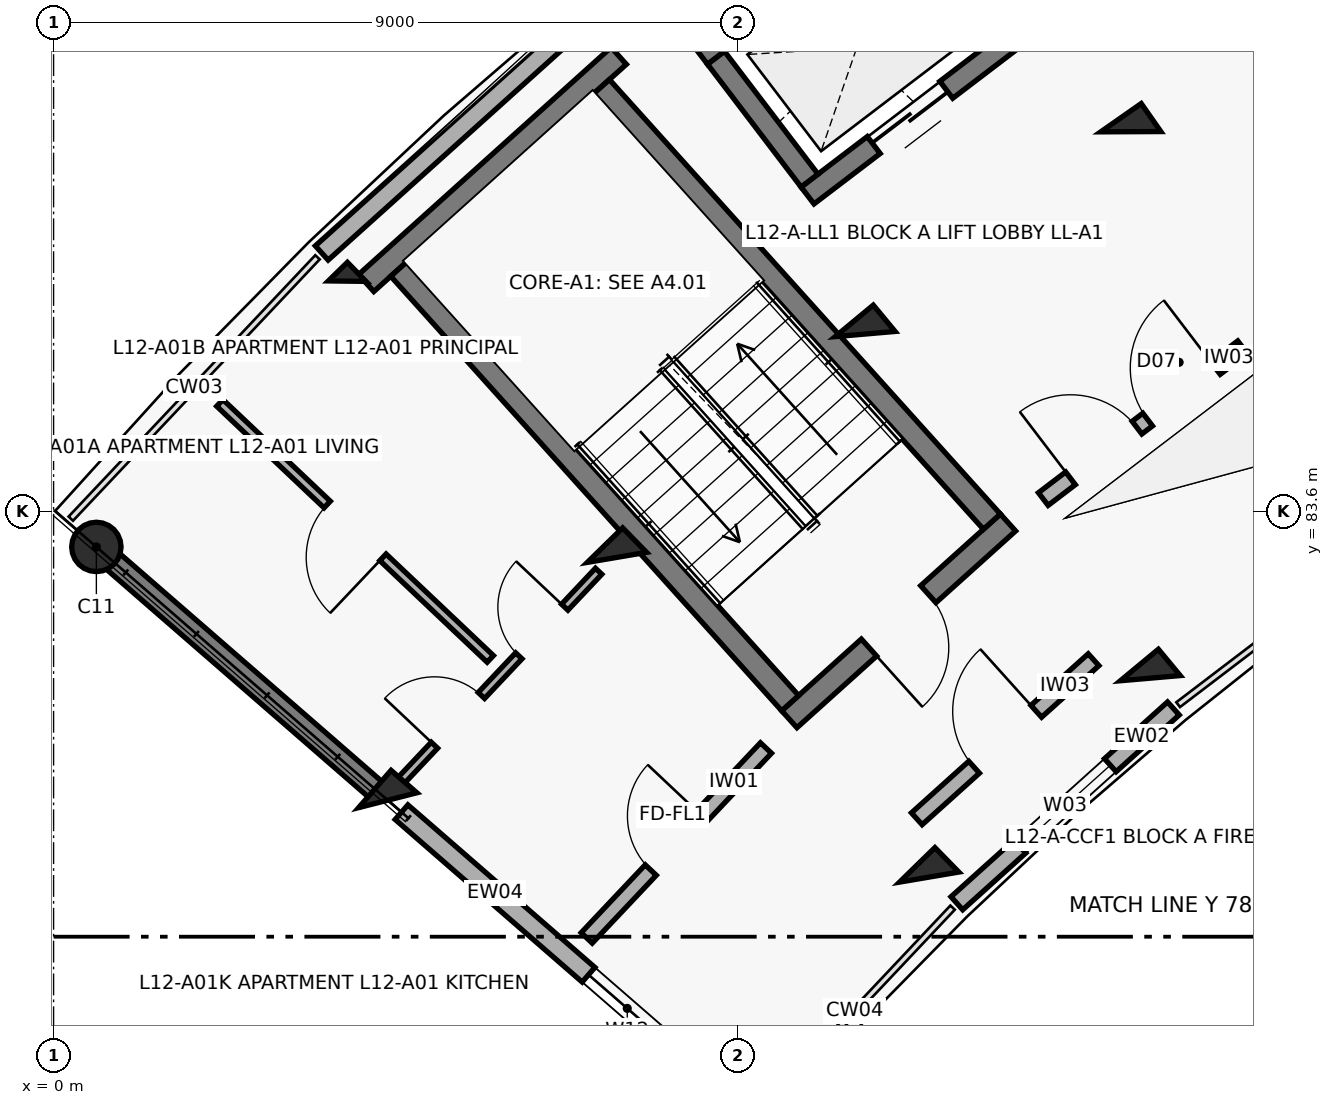
"""IFC4 building model, lengths in metres.
Left out: names, types, materials, properties, quantities, classifications, styles, units other than length and angle.
Written with IfcOpenShell. Run it as: python <this file> out.ifc"""

import sys

from ifc_helpers import new_model, si_unit, direction, frame, frame_2d, origin, origin_2d, place, context, subcontext, project, spatial, rectangle, circle, extrude, element, fill, save


model = new_model("IFC4")
c1 = context("Model", 3, precision=1e-05, world=origin(), true_north=direction((0.0, 1.0)))
c2 = subcontext(c1, "Body", "Model", "MODEL_VIEW")
j1 = project(units=[si_unit("LENGTHUNIT", "METRE"), si_unit("PLANEANGLEUNIT", "RADIAN")], contexts=[c1])
p1 = place(None, origin())
s1 = spatial("IfcSite", under=j1, at=p1, CompositionType="ELEMENT")
p2 = place(p1, origin())
s2 = spatial("IfcBuilding", under=s1, at=p2, CompositionType="ELEMENT")
p3 = place(p2, frame((0.0, 0.0, 39.1)))
s3 = spatial("IfcBuildingStorey", under=s2, at=p3, CompositionType="ELEMENT", Elevation=39.1)
p4 = place(p3, frame((4.397, 79.796, 0.0), z_axis=(0.0, 0.0, 1.0), x_axis=(-0.754709580223, 0.656059028991, 0.0)))
e1 = element("IfcColumn", 1, at=p4, inside=s3, PredefinedType="COLUMN", context=c2, shape_type="SweptSolid", body=[
    extrude(rectangle(XDim=0.45, YDim=0.65, at=origin_2d()), origin(), (0.0, 0.0, 1.0), 3.1),
])
p5 = place(p3, frame((0.563, 83.129, 0.0), z_axis=(0.0, 0.0, 1.0), x_axis=(-0.754709580223, 0.656059028991, 0.0)))
e2 = element("IfcColumn", 2, at=p5, inside=s3, PredefinedType="COLUMN", context=c2, shape_type="SweptSolid", body=[
    extrude(circle(Radius=0.325, at=origin_2d()), origin(), (0.0, 0.0, 1.0), 3.1),
])
for number, where, z_axis, x_axis in (
    (3, (11.52, 78.784, 0.0), (0.0, 0.0, 1.0), (-0.699, 0.715, 0.0)),
    (4, (7.412, 82.991, 0.0), (0.0, 0.0, 1.0), (-0.699, 0.715, 0.0)),
):
    element("IfcColumn", number, at=place(p3, frame(where, z_axis=z_axis, x_axis=x_axis)), inside=s3, PredefinedType="COLUMN", context=c2, shape_type="SweptSolid", body=[
        extrude(rectangle(XDim=0.45, YDim=0.65, at=origin_2d()), origin(), (0.0, 0.0, 1.0), 3.1),
    ])
p6 = place(p3, frame((3.863, 86.626, 0.0), z_axis=(0.0, 0.0, 1.0), x_axis=(-0.698665066769, 0.715448897181, 0.0)))
e5 = element("IfcColumn", 5, at=p6, inside=s3, PredefinedType="COLUMN", context=c2, shape_type="SweptSolid", body=[
    extrude(rectangle(XDim=0.35, YDim=0.35, at=origin_2d()), origin(), (0.0, 0.0, 1.0), 3.1),
])
for number, where, z_axis, x_axis in (
    (6, (14.429, 81.402, 0.0), (0.0, 0.0, 1.0), (-0.638, 0.77, 0.0)),
    (7, (10.678, 85.93, 0.0), (0.0, 0.0, 1.0), (-0.638, 0.77, 0.0)),
):
    element("IfcColumn", number, at=place(p3, frame(where, z_axis=z_axis, x_axis=x_axis)), inside=s3, PredefinedType="COLUMN", context=c2, shape_type="SweptSolid", body=[
        extrude(rectangle(XDim=0.45, YDim=0.65, at=origin_2d()), origin(), (0.0, 0.0, 1.0), 3.1),
    ])
p7 = place(p3, frame((7.437, 89.842, 0.0), z_axis=(0.0, 0.0, 1.0), x_axis=(-0.637961754089, 0.770068049148, 0.0)))
e8 = element("IfcColumn", 8, at=p7, inside=s3, PredefinedType="COLUMN", context=c2, shape_type="SweptSolid", body=[
    extrude(rectangle(XDim=0.4, YDim=0.6, at=origin_2d()), origin(), (0.0, 0.0, 1.0), 3.1),
])
p8 = place(p3, frame((14.172, 88.592, 0.0), z_axis=(0.0, 0.0, 1.0), x_axis=(-0.573004420611, 0.819552276527, 0.0)))
e9 = element("IfcColumn", 9, at=p8, inside=s3, PredefinedType="COLUMN", context=c2, shape_type="SweptSolid", body=[
    extrude(rectangle(XDim=0.45, YDim=0.65, at=origin_2d()), origin(), (0.0, 0.0, 1.0), 3.1),
])
p9 = place(p3, frame((4.261, 79.914, 0.0), z_axis=(0.0, 0.0, 1.0), x_axis=(-0.754703505217, 0.65606601742, 0.0)))
e10 = element("IfcWall", 10, at=p9, inside=s3, PredefinedType="SHEAR", context=c2, shape_type="SweptSolid", body=[
    extrude(rectangle(XDim=4.72, YDim=0.27, at=frame_2d((2.36, 0.0))), origin(), (0.0, 0.0, 1.0), 2.86),
])
p10 = place(p3, frame((3.528, 86.997, 0.0), z_axis=(0.0, 0.0, 1.0), x_axis=(0.743387539862, 0.668860946369, 0.0)))
e11 = element("IfcWall", 11, at=p10, inside=s3, PredefinedType="SOLIDWALL", context=c2, shape_type="SweptSolid", body=[
    extrude(rectangle(XDim=4.809, YDim=0.252, at=frame_2d((2.405, 0.0))), origin(), (0.0, 0.0, 1.0), 2.25),
])
p11 = place(p3, frame((11.884, 78.44, 0.0), z_axis=(0.0, 0.0, 1.0), x_axis=(0.743363835609, 0.668887290886, 0.0)))
e12 = element("IfcWall", 12, at=p11, inside=s3, PredefinedType="SOLIDWALL", context=c2, shape_type="SweptSolid", body=[
    extrude(rectangle(XDim=3.832, YDim=0.23, at=frame_2d((1.916, 0.0))), origin(), (0.0, 0.0, 1.0), 2.25),
])
p12 = place(p11, frame((1.116, 0.0, 0.32)))
e13 = element("IfcOpeningElement", 13, at=p12, cuts=e12, PredefinedType="OPENING", context=c2, shape_type="SweptSolid", body=[
    extrude(rectangle(XDim=1.6, YDim=1.5, at=frame_2d((0.8, 0.75))), frame((0.0, 0.125, 0.0), z_axis=(0.0, -1.0, 0.0), x_axis=(1.0, 0.0, 0.0)), (0.0, 0.0, 1.0), 0.25),
])
p13 = place(p3, frame((8.653, 76.096, 0.0), z_axis=(0.0, 0.0, 1.0), x_axis=(-0.754709658894, 0.65605893849, 0.0)))
e14 = element("IfcWall", 14, at=p13, inside=s3, PredefinedType="SOLIDWALL", context=c2, shape_type="SweptSolid", body=[
    extrude(rectangle(XDim=5.4, YDim=0.255, at=frame_2d((2.7, 0.0))), origin(), (0.0, 0.0, 1.0), 2.18),
])
p14 = place(p13, frame((0.79, 0.0, 0.75)))
e15 = element("IfcOpeningElement", 15, at=p14, cuts=e14, PredefinedType="OPENING", context=c2, shape_type="SweptSolid", body=[
    extrude(rectangle(XDim=1.35, YDim=1.35, at=frame_2d((0.675, 0.675))), frame((0.0, 0.137, 0.0), z_axis=(0.0, -1.0, 0.0), x_axis=(1.0, 0.0, 0.0)), (0.0, 0.0, 1.0), 0.275),
])
p15 = place(p3, frame((12.557, 83.45, 0.0), z_axis=(0.0, 0.0, 1.0), x_axis=(-0.743375696158, -0.668874109501, 0.0)))
e16 = element("IfcWall", 16, at=p15, inside=s3, PredefinedType="SHEAR", context=c2, shape_type="SweptSolid", body=[
    extrude(rectangle(XDim=3.87, YDim=0.3, at=frame_2d((1.935, 0.0))), origin(), (0.0, 0.0, 1.0), 3.1),
])
p16 = place(p15, frame((1.41, 0.0, 0.0)))
e17 = element("IfcOpeningElement", 17, at=p16, cuts=e16, PredefinedType="OPENING", context=c2, shape_type="SweptSolid", body=[
    extrude(rectangle(XDim=1.05, YDim=2.15, at=frame_2d((0.525, 1.075))), frame((0.0, 0.16, 0.0), z_axis=(0.0, -1.0, 0.0), x_axis=(1.0, 0.0, 0.0)), (0.0, 0.0, 1.0), 0.32),
])
p17 = place(p3, frame((7.436, 89.59, 0.0), z_axis=(0.0, 0.0, 1.0), x_axis=(-0.743400052815, -0.668847038922, 0.0)))
e18 = element("IfcWall", 18, at=p17, inside=s3, PredefinedType="SHEAR", context=c2, shape_type="SweptSolid", body=[
    extrude(rectangle(XDim=4.47, YDim=0.3, at=frame_2d((2.235, 0.0))), origin(), (0.0, 0.0, 1.0), 3.1),
])
p18 = place(p3, frame((12.345, 83.461, 0.0), z_axis=(0.0, 0.0, 1.0), x_axis=(-0.668868253964, 0.743380964808, 0.0)))
e19 = element("IfcWall", 19, at=p18, inside=s3, PredefinedType="SHEAR", context=c2, shape_type="SweptSolid", body=[
    extrude(rectangle(XDim=7.69, YDim=0.3, at=frame_2d((3.845, 0.0))), origin(), (0.0, 0.0, 1.0), 3.1),
])
p19 = place(p3, frame((9.691, 81.073, 0.0), z_axis=(0.0, 0.0, 1.0), x_axis=(-0.668885797871, 0.743365179038, 0.0)))
e20 = element("IfcWall", 20, at=p19, inside=s3, PredefinedType="SHEAR", context=c2, shape_type="SweptSolid", body=[
    extrude(rectangle(XDim=7.69, YDim=0.3, at=frame_2d((3.845, 0.0))), origin(), (0.0, 0.0, 1.0), 3.1),
])
p20 = place(p3, frame((12.616, 89.807, 0.0), z_axis=(0.0, 0.0, 1.0), x_axis=(-0.795474703455, -0.605986795371, 0.0)))
e21 = element("IfcWall", 21, at=p20, inside=s3, PredefinedType="SHEAR", context=c2, shape_type="SweptSolid", body=[
    extrude(rectangle(XDim=3.39, YDim=0.28, at=frame_2d((1.695, 0.0))), origin(), (0.0, 0.0, 1.0), 3.1),
])
p21 = place(p20, frame((1.095, 0.0, 0.0)))
e22 = element("IfcOpeningElement", 22, at=p21, cuts=e21, PredefinedType="OPENING", context=c2, shape_type="SweptSolid", body=[
    extrude(rectangle(XDim=1.2, YDim=2.15, at=frame_2d((0.6, 1.075))), frame((0.0, 0.15, 0.0), z_axis=(0.0, -1.0, 0.0), x_axis=(1.0, 0.0, 0.0)), (0.0, 0.0, 1.0), 0.3),
])
p22 = place(p3, frame((11.216, 91.645, 0.0), z_axis=(0.0, 0.0, 1.0), x_axis=(-0.795439986025, -0.606032365994, 0.0)))
e23 = element("IfcWall", 23, at=p22, inside=s3, PredefinedType="SHEAR", context=c2, shape_type="SweptSolid", body=[
    extrude(rectangle(XDim=3.39, YDim=0.28, at=frame_2d((1.695, 0.0))), origin(), (0.0, 0.0, 1.0), 3.1),
])
p23 = place(p3, frame((9.946, 87.949, 0.0), z_axis=(0.0, 0.0, 1.0), x_axis=(-0.605891019062, 0.795547656033, 0.0)))
e24 = element("IfcWall", 24, at=p23, inside=s3, PredefinedType="SHEAR", context=c2, shape_type="SweptSolid", body=[
    extrude(rectangle(XDim=2.03, YDim=0.28, at=frame_2d((1.015, 0.0))), origin(), (0.0, 0.0, 1.0), 3.1),
])
p24 = place(p3, frame((7.014, 77.984, 0.0), z_axis=(0.0, 0.0, 1.0), x_axis=(0.686310507227, 0.727308660522, 0.0)))
e25 = element("IfcWall", 25, at=p24, inside=s3, PredefinedType="SOLIDWALL", context=c2, shape_type="SweptSolid", body=[
    extrude(rectangle(XDim=3.436, YDim=0.2, at=frame_2d((1.718, 0.0))), origin(), (0.0, 0.0, 1.0), 2.08),
])
p25 = place(p24, frame((1.228, 0.0, 0.0)))
e26 = element("IfcOpeningElement", 26, at=p25, cuts=e25, PredefinedType="OPENING", context=c2, shape_type="SweptSolid", body=[
    extrude(rectangle(XDim=0.98, YDim=2.15, at=frame_2d((0.49, 1.075))), frame((0.0, 0.11, 0.0), z_axis=(0.0, -1.0, 0.0), x_axis=(1.0, 0.0, 0.0)), (0.0, 0.0, 1.0), 0.22),
])
p26 = place(p3, frame((4.565, 80.047, 0.0), z_axis=(0.0, 0.0, 1.0), x_axis=(0.686300649561, 0.727317962388, 0.0)))
e27 = element("IfcWall", 27, at=p26, inside=s3, PredefinedType="PARTITIONING", context=c2, shape_type="SweptSolid", body=[
    extrude(rectangle(XDim=3.797, YDim=0.115, at=frame_2d((1.899, 0.0))), origin(), (0.0, 0.0, 1.0), 2.08),
])
p27 = place(p26, frame((0.65, 0.0, 0.0)))
e28 = element("IfcOpeningElement", 28, at=p27, cuts=e27, PredefinedType="OPENING", context=c2, shape_type="SweptSolid", body=[
    extrude(rectangle(XDim=0.9, YDim=2.1, at=frame_2d((0.45, 1.05))), frame((0.0, 0.067, 0.0), z_axis=(0.0, -1.0, 0.0), x_axis=(1.0, 0.0, 0.0)), (0.0, 0.0, 1.0), 0.135),
])
p28 = place(p26, frame((2.267, 0.0, 0.0)))
e29 = element("IfcOpeningElement", 29, at=p28, cuts=e27, PredefinedType="OPENING", context=c2, shape_type="SweptSolid", body=[
    extrude(rectangle(XDim=0.88, YDim=2.1, at=frame_2d((0.44, 1.05))), frame((0.0, 0.067, 0.0), z_axis=(0.0, -1.0, 0.0), x_axis=(1.0, 0.0, 0.0)), (0.0, 0.0, 1.0), 0.135),
])
p29 = place(p3, frame((5.746, 81.655, 0.0), z_axis=(0.0, 0.0, 1.0), x_axis=(-0.726295620759, 0.687382478149, 0.0)))
e30 = element("IfcWall", 30, at=p29, inside=s3, PredefinedType="PARTITIONING", context=c2, shape_type="SweptSolid", body=[
    extrude(rectangle(XDim=4.9, YDim=0.12, at=frame_2d((2.45, 0.0))), origin(), (0.0, 0.0, 1.0), 2.08),
])
p30 = place(p29, frame((1.945, 0.0, 0.0)))
e31 = element("IfcOpeningElement", 31, at=p30, cuts=e30, PredefinedType="OPENING", context=c2, shape_type="SweptSolid", body=[
    extrude(rectangle(XDim=1.01, YDim=2.1, at=frame_2d((0.505, 1.05))), frame((0.0, 0.07, 0.0), z_axis=(0.0, -1.0, 0.0), x_axis=(1.0, 0.0, 0.0)), (0.0, 0.0, 1.0), 0.14),
])
p31 = place(p3, frame((11.357, 79.552, 0.0), z_axis=(0.0, 0.0, 1.0), x_axis=(0.743387266925, 0.668861249718, 0.0)))
e32 = element("IfcWall", 32, at=p31, inside=s3, PredefinedType="SOLIDWALL", context=c2, shape_type="SweptSolid", body=[
    extrude(rectangle(XDim=3.128, YDim=0.21, at=frame_2d((1.564, 0.0))), origin(), (0.0, 0.0, 1.0), 2.08),
])
p32 = place(p31, frame((1.014, 0.0, 0.0)))
e33 = element("IfcOpeningElement", 33, at=p32, cuts=e32, PredefinedType="OPENING", context=c2, shape_type="SweptSolid", body=[
    extrude(rectangle(XDim=1.1, YDim=2.15, at=frame_2d((0.55, 1.075))), frame((0.0, 0.115, 0.0), z_axis=(0.0, -1.0, 0.0), x_axis=(1.0, 0.0, 0.0)), (0.0, 0.0, 1.0), 0.23),
])
p33 = place(p3, frame((13.021, 83.759, 0.0), z_axis=(0.0, 0.0, 1.0), x_axis=(0.795498026433, 0.605956178235, 0.0)))
e34 = element("IfcWall", 34, at=p33, inside=s3, PredefinedType="SOLIDWALL", context=c2, shape_type="SweptSolid", body=[
    extrude(rectangle(XDim=3.296, YDim=0.21, at=frame_2d((1.648, 0.0))), origin(), (0.0, 0.0, 1.0), 2.08),
])
p34 = place(p33, frame((0.45, 0.0, 0.0)))
e35 = element("IfcOpeningElement", 35, at=p34, cuts=e34, PredefinedType="OPENING", context=c2, shape_type="SweptSolid", body=[
    extrude(rectangle(XDim=1.1, YDim=2.15, at=frame_2d((0.55, 1.075))), frame((0.0, 0.115, 0.0), z_axis=(0.0, -1.0, 0.0), x_axis=(1.0, 0.0, 0.0)), (0.0, 0.0, 1.0), 0.23),
])
p35 = place(p33, frame((1.726, 0.0, 0.0)))
e36 = element("IfcOpeningElement", 36, at=p35, cuts=e34, PredefinedType="OPENING", context=c2, shape_type="SweptSolid", body=[
    extrude(rectangle(XDim=1.12, YDim=2.15, at=frame_2d((0.56, 1.075))), frame((0.0, 0.115, 0.0), z_axis=(0.0, -1.0, 0.0), x_axis=(1.0, 0.0, 0.0)), (0.0, 0.0, 1.0), 0.23),
])
p36 = place(p3, frame((17.524, 87.288, 0.0), z_axis=(0.0, 0.0, 1.0), x_axis=(-0.540338452216, 0.841447774408, 0.0)))
e37 = element("IfcWall", 37, at=p36, inside=s3, PredefinedType="PARTITIONING", context=c2, shape_type="SweptSolid", body=[
    extrude(rectangle(XDim=7.95, YDim=0.14, at=frame_2d((3.975, 0.0))), origin(), (0.0, 0.0, 1.0), 2.08),
])
p37 = place(p36, frame((6.05, 0.0, 0.0)))
e38 = element("IfcOpeningElement", 38, at=p37, cuts=e37, PredefinedType="OPENING", context=c2, shape_type="SweptSolid", body=[
    extrude(rectangle(XDim=0.92, YDim=2.1, at=frame_2d((0.46, 1.05))), frame((0.0, 0.08, 0.0), z_axis=(0.0, -1.0, 0.0), x_axis=(1.0, 0.0, 0.0)), (0.0, 0.0, 1.0), 0.16),
])
p38 = place(p12, origin())
e39 = element("IfcWindow", 39, at=p38, inside=s3, PartitioningType="DOUBLE_PANEL_VERTICAL", PredefinedType="WINDOW", context=c2, shape_type="SweptSolid", body=[
    extrude(rectangle(XDim=1.6, YDim=1.5, at=frame_2d((0.8, 0.75))), frame((0.0, 0.03, 0.0), z_axis=(0.0, -1.0, 0.0), x_axis=(1.0, 0.0, 0.0)), (0.0, 0.0, 1.0), 0.06),
])
fill(e13, e39)
p39 = place(p14, origin())
e40 = element("IfcWindow", 40, at=p39, inside=s3, PartitioningType="DOUBLE_PANEL_VERTICAL", PredefinedType="WINDOW", context=c2, shape_type="SweptSolid", body=[
    extrude(rectangle(XDim=1.35, YDim=1.35, at=frame_2d((0.675, 0.675))), frame((0.0, 0.03, 0.0), z_axis=(0.0, -1.0, 0.0), x_axis=(1.0, 0.0, 0.0)), (0.0, 0.0, 1.0), 0.06),
])
fill(e15, e40)
p40 = place(p16, origin())
e41 = element("IfcDoor", 41, at=p40, inside=s3, OperationType="SINGLE_SWING_RIGHT", PredefinedType="DOOR", context=c2, shape_type="SweptSolid", body=[
    extrude(rectangle(XDim=1.05, YDim=2.15, at=frame_2d((0.525, 1.075))), frame((0.0, 0.025, 0.0), z_axis=(0.0, -1.0, 0.0), x_axis=(1.0, 0.0, 0.0)), (0.0, 0.0, 1.0), 0.05),
])
fill(e17, e41)
p41 = place(p21, origin())
e42 = element("IfcDoor", 42, at=p41, inside=s3, OperationType="DOUBLE_DOOR_SLIDING", PredefinedType="DOOR", context=c2, shape_type="SweptSolid", body=[
    extrude(rectangle(XDim=1.2, YDim=2.15, at=frame_2d((0.6, 1.075))), frame((0.0, 0.025, 0.0), z_axis=(0.0, -1.0, 0.0), x_axis=(1.0, 0.0, 0.0)), (0.0, 0.0, 1.0), 0.05),
])
fill(e22, e42)
p42 = place(p25, origin())
e43 = element("IfcDoor", 43, at=p42, inside=s3, OperationType="SINGLE_SWING_RIGHT", PredefinedType="DOOR", context=c2, shape_type="SweptSolid", body=[
    extrude(rectangle(XDim=0.98, YDim=2.15, at=frame_2d((0.49, 1.075))), frame((0.0, 0.025, 0.0), z_axis=(0.0, -1.0, 0.0), x_axis=(1.0, 0.0, 0.0)), (0.0, 0.0, 1.0), 0.05),
])
fill(e26, e43)
p43 = place(p27, origin())
e44 = element("IfcDoor", 44, at=p43, inside=s3, OperationType="SINGLE_SWING_LEFT", PredefinedType="DOOR", context=c2, shape_type="SweptSolid", body=[
    extrude(rectangle(XDim=0.9, YDim=2.1, at=frame_2d((0.45, 1.05))), frame((0.0, 0.025, 0.0), z_axis=(0.0, -1.0, 0.0), x_axis=(1.0, 0.0, 0.0)), (0.0, 0.0, 1.0), 0.05),
])
fill(e28, e44)
p44 = place(p28, origin())
e45 = element("IfcDoor", 45, at=p44, inside=s3, OperationType="SINGLE_SWING_RIGHT", PredefinedType="DOOR", context=c2, shape_type="SweptSolid", body=[
    extrude(rectangle(XDim=0.88, YDim=2.1, at=frame_2d((0.44, 1.05))), frame((0.0, 0.025, 0.0), z_axis=(0.0, -1.0, 0.0), x_axis=(1.0, 0.0, 0.0)), (0.0, 0.0, 1.0), 0.05),
])
fill(e29, e45)
p45 = place(p30, origin())
e46 = element("IfcDoor", 46, at=p45, inside=s3, OperationType="SINGLE_SWING_LEFT", PredefinedType="DOOR", context=c2, shape_type="SweptSolid", body=[
    extrude(rectangle(XDim=1.01, YDim=2.1, at=frame_2d((0.505, 1.05))), frame((0.0, 0.025, 0.0), z_axis=(0.0, -1.0, 0.0), x_axis=(1.0, 0.0, 0.0)), (0.0, 0.0, 1.0), 0.05),
])
fill(e31, e46)
p46 = place(p32, origin())
e47 = element("IfcDoor", 47, at=p46, inside=s3, OperationType="SINGLE_SWING_RIGHT", PredefinedType="DOOR", context=c2, shape_type="SweptSolid", body=[
    extrude(rectangle(XDim=1.1, YDim=2.15, at=frame_2d((0.55, 1.075))), frame((0.0, 0.025, 0.0), z_axis=(0.0, -1.0, 0.0), x_axis=(1.0, 0.0, 0.0)), (0.0, 0.0, 1.0), 0.05),
])
fill(e33, e47)
p47 = place(p34, origin())
e48 = element("IfcDoor", 48, at=p47, inside=s3, OperationType="SINGLE_SWING_LEFT", PredefinedType="DOOR", context=c2, shape_type="SweptSolid", body=[
    extrude(rectangle(XDim=1.1, YDim=2.15, at=frame_2d((0.55, 1.075))), frame((0.0, 0.025, 0.0), z_axis=(0.0, -1.0, 0.0), x_axis=(1.0, 0.0, 0.0)), (0.0, 0.0, 1.0), 0.05),
])
fill(e35, e48)
p48 = place(p35, origin())
e49 = element("IfcDoor", 49, at=p48, inside=s3, OperationType="SINGLE_SWING_RIGHT", PredefinedType="DOOR", context=c2, shape_type="SweptSolid", body=[
    extrude(rectangle(XDim=1.12, YDim=2.15, at=frame_2d((0.56, 1.075))), frame((0.0, 0.025, 0.0), z_axis=(0.0, -1.0, 0.0), x_axis=(1.0, 0.0, 0.0)), (0.0, 0.0, 1.0), 0.05),
])
fill(e36, e49)
save(model, sys.argv[1])
